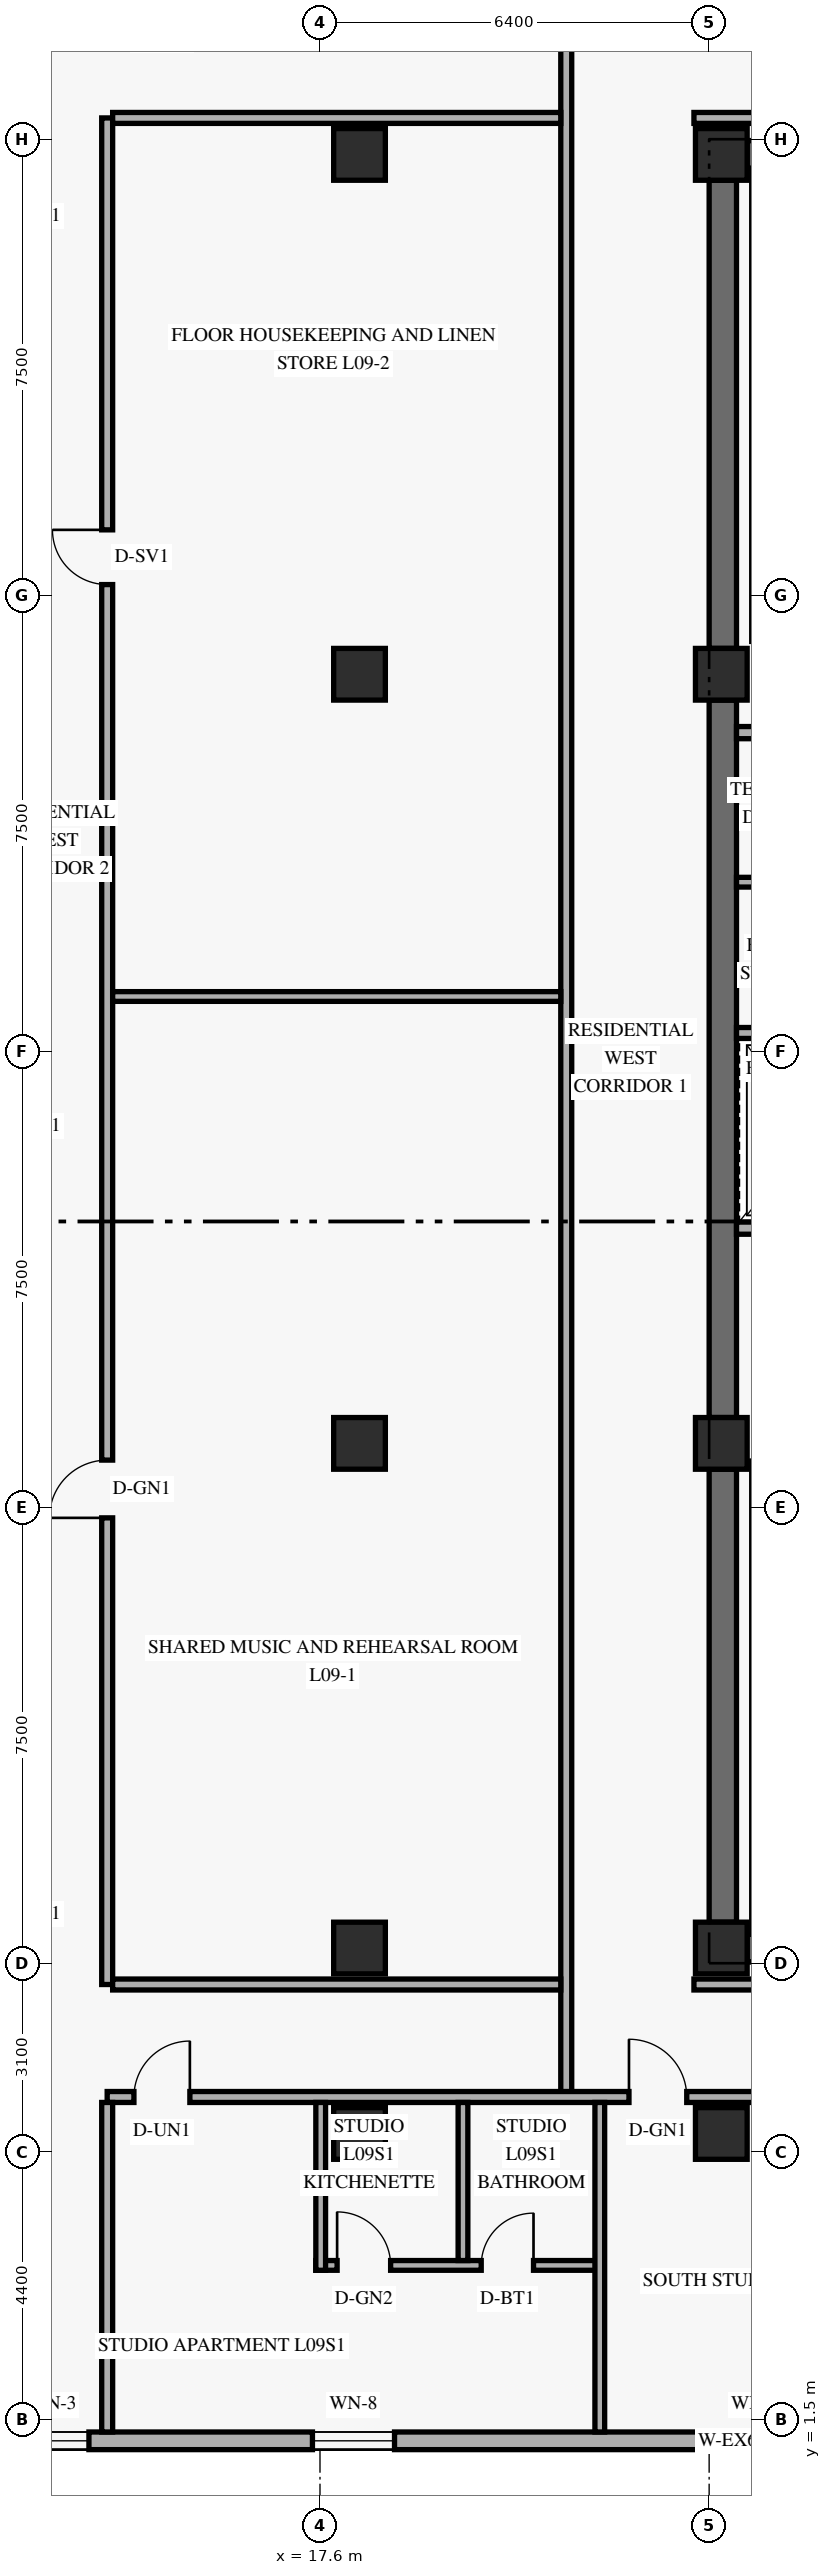
"""IFC4 building model, lengths in metres.
Left out: names, types, materials, properties, quantities, classifications, styles, units other than length and angle.
Written with IfcOpenShell. Run it as: python <this file> out.ifc"""

import sys

from ifc_helpers import new_model, si_unit, direction, frame, frame_2d, origin, origin_2d, place, context, subcontext, project, spatial, rectangle, extrude, element, fill, save


model = new_model("IFC4")
c1 = context("Model", 3, precision=1e-05, world=origin(), true_north=direction((0.0, 1.0)))
c2 = subcontext(c1, "Body", "Model", "MODEL_VIEW")
j1 = project(units=[si_unit("LENGTHUNIT", "METRE"), si_unit("PLANEANGLEUNIT", "RADIAN")], contexts=[c1])
p1 = place(None, origin())
s1 = spatial("IfcSite", under=j1, at=p1, CompositionType="ELEMENT")
p2 = place(p1, origin())
s2 = spatial("IfcBuilding", under=s1, at=p2, CompositionType="ELEMENT")
p3 = place(p2, frame((0.0, 0.0, 38.4)))
s3 = spatial("IfcBuildingStorey", under=s2, at=p3, CompositionType="ELEMENT", Elevation=38.4)
p4 = place(p3, frame((24.225, 9.675, 0.0), z_axis=(0.0, 0.0, 1.0), x_axis=(0.0, 1.0, 0.0)))
e1 = element("IfcWall", 1, at=p4, inside=s3, PredefinedType="SHEAR", context=c2, shape_type="SweptSolid", body=[
    extrude(rectangle(XDim=7.45, YDim=0.45, at=frame_2d((3.725, 0.0))), origin(), (0.0, 0.0, 1.0), 2.667),
])
p5 = place(p3, frame((24.225, 17.975, 0.0), z_axis=(0.0, 0.0, 1.0), x_axis=(0.0, 1.0, 0.0)))
e2 = element("IfcWall", 2, at=p5, inside=s3, PredefinedType="SHEAR", context=c2, shape_type="SweptSolid", body=[
    extrude(rectangle(XDim=11.8, YDim=0.45, at=frame_2d((5.9, 0.0))), origin(), (0.0, 0.0, 1.0), 2.667),
])
p6 = place(p3, frame((24.225, 30.625, 0.0), z_axis=(0.0, 0.0, 1.0), x_axis=(0.0, 1.0, 0.0)))
e3 = element("IfcWall", 3, at=p6, inside=s3, PredefinedType="SHEAR", context=c2, shape_type="SweptSolid", body=[
    extrude(rectangle(XDim=7.7, YDim=0.45, at=frame_2d((3.85, 0.0))), origin(), (0.0, 0.0, 1.0), 2.667),
])
for number, where, z_axis, x_axis in (
    (4, (24.625, 9.25, 0.0), (0.0, 0.0, 1.0), (1.0, 0.0, 0.0)),
    (5, (24.625, 38.75, 0.0), (0.0, 0.0, 1.0), (1.0, 0.0, 0.0)),
):
    element("IfcWall", number, at=place(p3, frame(where, z_axis=z_axis, x_axis=x_axis)), inside=s3, PredefinedType="SHEAR", context=c2, shape_type="SweptSolid", body=[
        extrude(rectangle(XDim=10.15, YDim=0.45, at=frame_2d((5.075, 0.0))), origin(), (0.0, 0.0, 1.0), 3.36),
    ])
for number, where, z_axis, x_axis in (
    (6, (18.25, 6.2, 0.0), (0.0, 0.0, 1.0), (1.0, 0.0, 0.0)),
    (7, (18.25, 9.25, 0.0), (0.0, 0.0, 1.0), (1.0, 0.0, 0.0)),
    (8, (18.25, 17.55, 0.0), (0.0, 0.0, 1.0), (1.0, 0.0, 0.0)),
    (9, (18.25, 30.2, 0.0), (0.0, 0.0, 1.0), (1.0, 0.0, 0.0)),
    (10, (18.25, 38.75, 0.0), (0.0, 0.0, 1.0), (1.0, 0.0, 0.0)),
    (11, (24.2, 6.2, 0.0), (0.0, 0.0, 1.0), (1.0, 0.0, 0.0)),
    (12, (24.2, 9.25, 0.0), (0.0, 0.0, 1.0), (1.0, 0.0, 0.0)),
    (13, (24.2, 17.55, 0.0), (0.0, 0.0, 1.0), (1.0, 0.0, 0.0)),
    (14, (24.2, 30.2, 0.0), (0.0, 0.0, 1.0), (1.0, 0.0, 0.0)),
    (15, (24.2, 38.75, 0.0), (0.0, 0.0, 1.0), (1.0, 0.0, 0.0)),
):
    element("IfcColumn", number, at=place(p3, frame(where, z_axis=z_axis, x_axis=x_axis)), inside=s3, PredefinedType="COLUMN", context=c2, shape_type="SweptSolid", body=[
        extrude(rectangle(XDim=0.85, YDim=0.85, at=origin_2d()), origin(), (0.0, 0.0, 1.0), 3.6),
    ])
p7 = place(p3, frame((5.42, 1.145, 0.0), z_axis=(0.0, 0.0, 1.0), x_axis=(1.0, 0.0, 0.0)))
e16 = element("IfcWall", 16, at=p7, inside=s3, PredefinedType="SOLIDWALL", context=c2, shape_type="SweptSolid", body=[
    extrude(rectangle(XDim=39.56, YDim=0.29, at=frame_2d((19.78, 0.0))), origin(), (0.0, 0.0, 1.0), 3.36),
])
p8 = place(p7, frame((2.765, 0.0, 0.85)))
e17 = element("IfcOpeningElement", 17, at=p8, cuts=e16, PredefinedType="OPENING", context=c2, shape_type="SweptSolid", body=[
    extrude(rectangle(XDim=1.35, YDim=1.55, at=frame_2d((0.675, 0.775))), frame((0.0, 0.155, 0.0), z_axis=(0.0, -1.0, 0.0), x_axis=(1.0, 0.0, 0.0)), (0.0, 0.0, 1.0), 0.31),
])
p9 = place(p7, frame((7.18, 0.0, 0.85)))
e18 = element("IfcOpeningElement", 18, at=p9, cuts=e16, PredefinedType="OPENING", context=c2, shape_type="SweptSolid", body=[
    extrude(rectangle(XDim=1.2, YDim=1.5, at=frame_2d((0.6, 0.75))), frame((0.0, 0.155, 0.0), z_axis=(0.0, -1.0, 0.0), x_axis=(1.0, 0.0, 0.0)), (0.0, 0.0, 1.0), 0.31),
])
p10 = place(p7, frame((12.056, 0.0, 0.85)))
e19 = element("IfcOpeningElement", 19, at=p10, cuts=e16, PredefinedType="OPENING", context=c2, shape_type="SweptSolid", body=[
    extrude(rectangle(XDim=1.35, YDim=1.55, at=frame_2d((0.675, 0.775))), frame((0.0, 0.155, 0.0), z_axis=(0.0, -1.0, 0.0), x_axis=(1.0, 0.0, 0.0)), (0.0, 0.0, 1.0), 0.31),
])
p11 = place(p7, frame((18.665, 0.0, 0.85)))
e20 = element("IfcOpeningElement", 20, at=p11, cuts=e16, PredefinedType="OPENING", context=c2, shape_type="SweptSolid", body=[
    extrude(rectangle(XDim=1.35, YDim=1.55, at=frame_2d((0.675, 0.775))), frame((0.0, 0.155, 0.0), z_axis=(0.0, -1.0, 0.0), x_axis=(1.0, 0.0, 0.0)), (0.0, 0.0, 1.0), 0.31),
])
p12 = place(p7, frame((25.274, 0.0, 0.85)))
e21 = element("IfcOpeningElement", 21, at=p12, cuts=e16, PredefinedType="OPENING", context=c2, shape_type="SweptSolid", body=[
    extrude(rectangle(XDim=1.35, YDim=1.55, at=frame_2d((0.675, 0.775))), frame((0.0, 0.155, 0.0), z_axis=(0.0, -1.0, 0.0), x_axis=(1.0, 0.0, 0.0)), (0.0, 0.0, 1.0), 0.31),
])
p13 = place(p7, frame((30.39, 0.0, 0.85)))
e22 = element("IfcOpeningElement", 22, at=p13, cuts=e16, PredefinedType="OPENING", context=c2, shape_type="SweptSolid", body=[
    extrude(rectangle(XDim=1.35, YDim=1.55, at=frame_2d((0.675, 0.775))), frame((0.0, 0.155, 0.0), z_axis=(0.0, -1.0, 0.0), x_axis=(1.0, 0.0, 0.0)), (0.0, 0.0, 1.0), 0.31),
])
p14 = place(p7, frame((32.763, 0.0, 0.85)))
e23 = element("IfcOpeningElement", 23, at=p14, cuts=e16, PredefinedType="OPENING", context=c2, shape_type="SweptSolid", body=[
    extrude(rectangle(XDim=1.35, YDim=1.55, at=frame_2d((0.675, 0.775))), frame((0.0, 0.155, 0.0), z_axis=(0.0, -1.0, 0.0), x_axis=(1.0, 0.0, 0.0)), (0.0, 0.0, 1.0), 0.31),
])
p15 = place(p7, frame((36.478, 0.0, 0.85)))
e24 = element("IfcOpeningElement", 24, at=p15, cuts=e16, PredefinedType="OPENING", context=c2, shape_type="SweptSolid", body=[
    extrude(rectangle(XDim=1.35, YDim=1.55, at=frame_2d((0.675, 0.775))), frame((0.0, 0.155, 0.0), z_axis=(0.0, -1.0, 0.0), x_axis=(1.0, 0.0, 0.0)), (0.0, 0.0, 1.0), 0.31),
])
p16 = place(p3, frame((24.45, 21.09, 0.0), z_axis=(0.0, 0.0, 1.0), x_axis=(1.0, 0.0, 0.0)))
e25 = element("IfcWall", 25, at=p16, inside=s3, PredefinedType="STANDARD", context=c2, shape_type="SweptSolid", body=[
    extrude(rectangle(XDim=6.83, YDim=0.2, at=frame_2d((3.415, 0.0))), origin(), (0.0, 0.0, 1.0), 3.36),
])
p17 = place(p16, frame((0.72, 0.0, 0.0)))
e26 = element("IfcOpeningElement", 26, at=p17, cuts=e25, PredefinedType="OPENING", context=c2, shape_type="SweptSolid", body=[
    extrude(rectangle(XDim=1.1, YDim=2.2, at=frame_2d((0.55, 1.1))), frame((0.0, 0.11, 0.0), z_axis=(0.0, -1.0, 0.0), x_axis=(1.0, 0.0, 0.0)), (0.0, 0.0, 1.0), 0.22),
])
p18 = place(p16, frame((3.32, 0.0, 0.0)))
e27 = element("IfcOpeningElement", 27, at=p18, cuts=e25, PredefinedType="OPENING", context=c2, shape_type="SweptSolid", body=[
    extrude(rectangle(XDim=1.1, YDim=2.2, at=frame_2d((0.55, 1.1))), frame((0.0, 0.11, 0.0), z_axis=(0.0, -1.0, 0.0), x_axis=(1.0, 0.0, 0.0)), (0.0, 0.0, 1.0), 0.22),
])
p19 = place(p3, frame((24.45, 24.3, 0.0), z_axis=(0.0, 0.0, 1.0), x_axis=(1.0, 0.0, 0.0)))
e28 = element("IfcWall", 28, at=p19, inside=s3, PredefinedType="STANDARD", context=c2, shape_type="SweptSolid", body=[
    extrude(rectangle(XDim=6.83, YDim=0.18, at=frame_2d((3.415, 0.0))), origin(), (0.0, 0.0, 1.0), 3.36),
])
p20 = place(p3, frame((24.45, 29.24, 0.0), z_axis=(0.0, 0.0, 1.0), x_axis=(1.0, 0.0, 0.0)))
e29 = element("IfcWall", 29, at=p20, inside=s3, PredefinedType="STANDARD", context=c2, shape_type="SweptSolid", body=[
    extrude(rectangle(XDim=3.65, YDim=0.2, at=frame_2d((1.825, 0.0))), origin(), (0.0, 0.0, 1.0), 3.36),
])
p21 = place(p3, frame((24.45, 26.78, 0.0), z_axis=(0.0, 0.0, 1.0), x_axis=(1.0, 0.0, 0.0)))
e30 = element("IfcWall", 30, at=p21, inside=s3, PredefinedType="PARTITIONING", context=c2, shape_type="SweptSolid", body=[
    extrude(rectangle(XDim=3.55, YDim=0.16, at=frame_2d((1.775, 0.0))), origin(), (0.0, 0.0, 1.0), 3.36),
])
p22 = place(p3, frame((21.65, 6.8, 0.0), z_axis=(0.0, 0.0, 1.0), x_axis=(0.0, 1.0, 0.0)))
e31 = element("IfcWall", 31, at=p22, inside=s3, PredefinedType="STANDARD", context=c2, shape_type="SweptSolid", body=[
    extrude(rectangle(XDim=34.4, YDim=0.18, at=frame_2d((17.2, 0.0))), origin(), (0.0, 0.0, 1.0), 2.649),
])
p23 = place(p3, frame((14.1, 6.8, 0.0), z_axis=(0.0, 0.0, 1.0), x_axis=(1.0, 0.0, 0.0)))
e32 = element("IfcWall", 32, at=p23, inside=s3, PredefinedType="STANDARD", context=c2, shape_type="SweptSolid", body=[
    extrude(rectangle(XDim=21.32, YDim=0.18, at=frame_2d((10.66, 0.0))), origin(), (0.0, 0.0, 1.0), 2.649),
])
p24 = place(p23, frame((0.44, 0.0, 0.0)))
e33 = element("IfcOpeningElement", 33, at=p24, cuts=e32, PredefinedType="OPENING", context=c2, shape_type="SweptSolid", body=[
    extrude(rectangle(XDim=0.92, YDim=2.15, at=frame_2d((0.46, 1.075))), frame((0.0, 0.1, 0.0), z_axis=(0.0, -1.0, 0.0), x_axis=(1.0, 0.0, 0.0)), (0.0, 0.0, 1.0), 0.2),
])
p25 = place(p23, frame((8.582, 0.0, 0.0)))
e34 = element("IfcOpeningElement", 34, at=p25, cuts=e32, PredefinedType="OPENING", context=c2, shape_type="SweptSolid", body=[
    extrude(rectangle(XDim=0.95, YDim=2.15, at=frame_2d((0.475, 1.075))), frame((0.0, 0.1, 0.0), z_axis=(0.0, -1.0, 0.0), x_axis=(1.0, 0.0, 0.0)), (0.0, 0.0, 1.0), 0.2),
])
p26 = place(p23, frame((13.658, 0.0, 0.0)))
e35 = element("IfcOpeningElement", 35, at=p26, cuts=e32, PredefinedType="OPENING", context=c2, shape_type="SweptSolid", body=[
    extrude(rectangle(XDim=0.92, YDim=2.15, at=frame_2d((0.46, 1.075))), frame((0.0, 0.1, 0.0), z_axis=(0.0, -1.0, 0.0), x_axis=(1.0, 0.0, 0.0)), (0.0, 0.0, 1.0), 0.2),
])
for number, where, z_axis, x_axis in (
    (36, (23.75, 8.65, 0.0), (0.0, 0.0, 1.0), (1.0, 0.0, 0.0)),
    (37, (23.75, 39.35, 0.0), (0.0, 0.0, 1.0), (1.0, 0.0, 0.0)),
):
    element("IfcWall", number, at=place(p3, frame(where, z_axis=z_axis, x_axis=x_axis)), inside=s3, PredefinedType="STANDARD", context=c2, shape_type="SweptSolid", body=[
        extrude(rectangle(XDim=11.67, YDim=0.18, at=frame_2d((5.835, 0.0))), origin(), (0.0, 0.0, 1.0), 2.649),
    ])
p27 = place(p3, frame((14.1, 8.65, 0.0), z_axis=(0.0, 0.0, 1.0), x_axis=(0.0, 1.0, 0.0)))
e38 = element("IfcWall", 38, at=p27, inside=s3, PredefinedType="STANDARD", context=c2, shape_type="SweptSolid", body=[
    extrude(rectangle(XDim=30.7, YDim=0.18, at=frame_2d((15.35, 0.0))), origin(), (0.0, 0.0, 1.0), 2.649),
])
p28 = place(p27, frame((7.675, 0.0, 0.0)))
e39 = element("IfcOpeningElement", 39, at=p28, cuts=e38, PredefinedType="OPENING", context=c2, shape_type="SweptSolid", body=[
    extrude(rectangle(XDim=0.95, YDim=2.15, at=frame_2d((0.475, 1.075))), frame((0.0, 0.1, 0.0), z_axis=(0.0, -1.0, 0.0), x_axis=(1.0, 0.0, 0.0)), (0.0, 0.0, 1.0), 0.2),
])
p29 = place(p27, frame((23.025, 0.0, 0.0)))
e40 = element("IfcOpeningElement", 40, at=p29, cuts=e38, PredefinedType="OPENING", context=c2, shape_type="SweptSolid", body=[
    extrude(rectangle(XDim=0.9, YDim=2.1, at=frame_2d((0.45, 1.05))), frame((0.0, 0.1, 0.0), z_axis=(0.0, -1.0, 0.0), x_axis=(1.0, 0.0, 0.0)), (0.0, 0.0, 1.0), 0.2),
])
for number, where, z_axis, x_axis in (
    (41, (14.19, 8.65, 0.0), (0.0, 0.0, 1.0), (1.0, 0.0, 0.0)),
    (42, (14.19, 39.35, 0.0), (0.0, 0.0, 1.0), (1.0, 0.0, 0.0)),
):
    element("IfcWall", number, at=place(p3, frame(where, z_axis=z_axis, x_axis=x_axis)), inside=s3, PredefinedType="STANDARD", context=c2, shape_type="SweptSolid", body=[
        extrude(rectangle(XDim=7.37, YDim=0.18, at=frame_2d((3.685, 0.0))), origin(), (0.0, 0.0, 1.0), 2.649),
    ])
p30 = place(p3, frame((14.1, 1.29, 0.0), z_axis=(0.0, 0.0, 1.0), x_axis=(0.0, 1.0, 0.0)))
e43 = element("IfcWall", 43, at=p30, inside=s3, PredefinedType="PARTITIONING", context=c2, shape_type="SweptSolid", body=[
    extrude(rectangle(XDim=5.42, YDim=0.18, at=frame_2d((2.71, 0.0))), origin(), (0.0, 0.0, 1.0), 2.809),
])
p31 = place(p3, frame((14.19, 24.9, 0.0), z_axis=(0.0, 0.0, 1.0), x_axis=(1.0, 0.0, 0.0)))
e44 = element("IfcWall", 44, at=p31, inside=s3, PredefinedType="PARTITIONING", context=c2, shape_type="SweptSolid", body=[
    extrude(rectangle(XDim=7.37, YDim=0.16, at=frame_2d((3.685, 0.0))), origin(), (0.0, 0.0, 1.0), 2.649),
])
p32 = place(p3, frame((17.531, 4.03, 0.0), z_axis=(0.0, 0.0, 1.0), x_axis=(1.0, 0.0, 0.0)))
e45 = element("IfcWall", 45, at=p32, inside=s3, PredefinedType="PLUMBINGWALL", context=c2, shape_type="SweptSolid", body=[
    extrude(rectangle(XDim=4.67, YDim=0.16, at=frame_2d((2.335, 0.0))), origin(), (0.0, 0.0, 1.0), 3.36),
])
p33 = place(p32, frame((0.35, 0.0, 0.0)))
e46 = element("IfcOpeningElement", 46, at=p33, cuts=e45, PredefinedType="OPENING", context=c2, shape_type="SweptSolid", body=[
    extrude(rectangle(XDim=0.88, YDim=2.12, at=frame_2d((0.44, 1.06))), frame((0.0, 0.09, 0.0), z_axis=(0.0, -1.0, 0.0), x_axis=(1.0, 0.0, 0.0)), (0.0, 0.0, 1.0), 0.18),
])
p34 = place(p32, frame((2.72, 0.0, 0.0)))
e47 = element("IfcOpeningElement", 47, at=p34, cuts=e45, PredefinedType="OPENING", context=c2, shape_type="SweptSolid", body=[
    extrude(rectangle(XDim=0.86, YDim=2.12, at=frame_2d((0.43, 1.06))), frame((0.0, 0.09, 0.0), z_axis=(0.0, -1.0, 0.0), x_axis=(1.0, 0.0, 0.0)), (0.0, 0.0, 1.0), 0.18),
])
p35 = place(p3, frame((17.612, 3.95, 0.0), z_axis=(0.0, 0.0, 1.0), x_axis=(0.0, 1.0, 0.0)))
e48 = element("IfcWall", 48, at=p35, inside=s3, PredefinedType="PLUMBINGWALL", context=c2, shape_type="SweptSolid", body=[
    extrude(rectangle(XDim=2.76, YDim=0.16, at=frame_2d((1.38, 0.0))), origin(), (0.0, 0.0, 1.0), 2.809),
])
p36 = place(p3, frame((19.952, 4.11, 0.0), z_axis=(0.0, 0.0, 1.0), x_axis=(0.0, 1.0, 0.0)))
e49 = element("IfcWall", 49, at=p36, inside=s3, PredefinedType="PLUMBINGWALL", context=c2, shape_type="SweptSolid", body=[
    extrude(rectangle(XDim=2.6, YDim=0.16, at=frame_2d((1.3, 0.0))), origin(), (0.0, 0.0, 1.0), 2.809),
])
p37 = place(p3, frame((22.202, 1.29, 0.0), z_axis=(0.0, 0.0, 1.0), x_axis=(0.0, 1.0, 0.0)))
e50 = element("IfcWall", 50, at=p37, inside=s3, PredefinedType="PARTITIONING", context=c2, shape_type="SweptSolid", body=[
    extrude(rectangle(XDim=5.42, YDim=0.16, at=frame_2d((2.71, 0.0))), origin(), (0.0, 0.0, 1.0), 2.809),
])
p38 = place(p9, origin())
e51 = element("IfcWindow", 51, at=p38, inside=s3, PartitioningType="SINGLE_PANEL", PredefinedType="WINDOW", context=c2, shape_type="SweptSolid", body=[
    extrude(rectangle(XDim=1.2, YDim=1.5, at=frame_2d((0.6, 0.75))), frame((0.0, 0.03, 0.0), z_axis=(0.0, -1.0, 0.0), x_axis=(1.0, 0.0, 0.0)), (0.0, 0.0, 1.0), 0.06),
])
fill(e18, e51)
p39 = place(p10, origin())
e52 = element("IfcWindow", 52, at=p39, inside=s3, PartitioningType="SINGLE_PANEL", PredefinedType="WINDOW", context=c2, shape_type="SweptSolid", body=[
    extrude(rectangle(XDim=1.35, YDim=1.55, at=frame_2d((0.675, 0.775))), frame((0.0, 0.03, 0.0), z_axis=(0.0, -1.0, 0.0), x_axis=(1.0, 0.0, 0.0)), (0.0, 0.0, 1.0), 0.06),
])
fill(e19, e52)
p40 = place(p11, origin())
e53 = element("IfcWindow", 53, at=p40, inside=s3, PartitioningType="SINGLE_PANEL", PredefinedType="WINDOW", context=c2, shape_type="SweptSolid", body=[
    extrude(rectangle(XDim=1.35, YDim=1.55, at=frame_2d((0.675, 0.775))), frame((0.0, 0.03, 0.0), z_axis=(0.0, -1.0, 0.0), x_axis=(1.0, 0.0, 0.0)), (0.0, 0.0, 1.0), 0.06),
])
fill(e20, e53)
p41 = place(p28, origin())
e54 = element("IfcDoor", 54, at=p41, inside=s3, OperationType="SINGLE_SWING_LEFT", PredefinedType="DOOR", context=c2, shape_type="SweptSolid", body=[
    extrude(rectangle(XDim=0.95, YDim=2.15, at=frame_2d((0.475, 1.075))), frame((0.0, 0.025, 0.0), z_axis=(0.0, -1.0, 0.0), x_axis=(1.0, 0.0, 0.0)), (0.0, 0.0, 1.0), 0.05),
])
fill(e39, e54)
p42 = place(p29, origin())
e55 = element("IfcDoor", 55, at=p42, inside=s3, OperationType="SINGLE_SWING_RIGHT", PredefinedType="DOOR", context=c2, shape_type="SweptSolid", body=[
    extrude(rectangle(XDim=0.9, YDim=2.1, at=frame_2d((0.45, 1.05))), frame((0.0, 0.025, 0.0), z_axis=(0.0, -1.0, 0.0), x_axis=(1.0, 0.0, 0.0)), (0.0, 0.0, 1.0), 0.05),
])
fill(e40, e55)
p43 = place(p24, origin())
e56 = element("IfcDoor", 56, at=p43, inside=s3, OperationType="SINGLE_SWING_RIGHT", PredefinedType="DOOR", context=c2, shape_type="SweptSolid", body=[
    extrude(rectangle(XDim=0.92, YDim=2.15, at=frame_2d((0.46, 1.075))), frame((0.0, 0.025, 0.0), z_axis=(0.0, -1.0, 0.0), x_axis=(1.0, 0.0, 0.0)), (0.0, 0.0, 1.0), 0.05),
])
fill(e33, e56)
p44 = place(p33, origin())
e57 = element("IfcDoor", 57, at=p44, inside=s3, OperationType="SINGLE_SWING_LEFT", PredefinedType="DOOR", context=c2, shape_type="SweptSolid", body=[
    extrude(rectangle(XDim=0.88, YDim=2.12, at=frame_2d((0.44, 1.06))), frame((0.0, 0.025, 0.0), z_axis=(0.0, -1.0, 0.0), x_axis=(1.0, 0.0, 0.0)), (0.0, 0.0, 1.0), 0.05),
])
fill(e46, e57)
p45 = place(p34, origin())
e58 = element("IfcDoor", 58, at=p45, inside=s3, OperationType="SINGLE_SWING_RIGHT", PredefinedType="DOOR", context=c2, shape_type="SweptSolid", body=[
    extrude(rectangle(XDim=0.86, YDim=2.12, at=frame_2d((0.43, 1.06))), frame((0.0, 0.025, 0.0), z_axis=(0.0, -1.0, 0.0), x_axis=(1.0, 0.0, 0.0)), (0.0, 0.0, 1.0), 0.05),
])
fill(e47, e58)
p46 = place(p25, origin())
e59 = element("IfcDoor", 59, at=p46, inside=s3, OperationType="SINGLE_SWING_LEFT", PredefinedType="DOOR", context=c2, shape_type="SweptSolid", body=[
    extrude(rectangle(XDim=0.95, YDim=2.15, at=frame_2d((0.475, 1.075))), frame((0.0, 0.025, 0.0), z_axis=(0.0, -1.0, 0.0), x_axis=(1.0, 0.0, 0.0)), (0.0, 0.0, 1.0), 0.05),
])
fill(e34, e59)
save(model, sys.argv[1])
